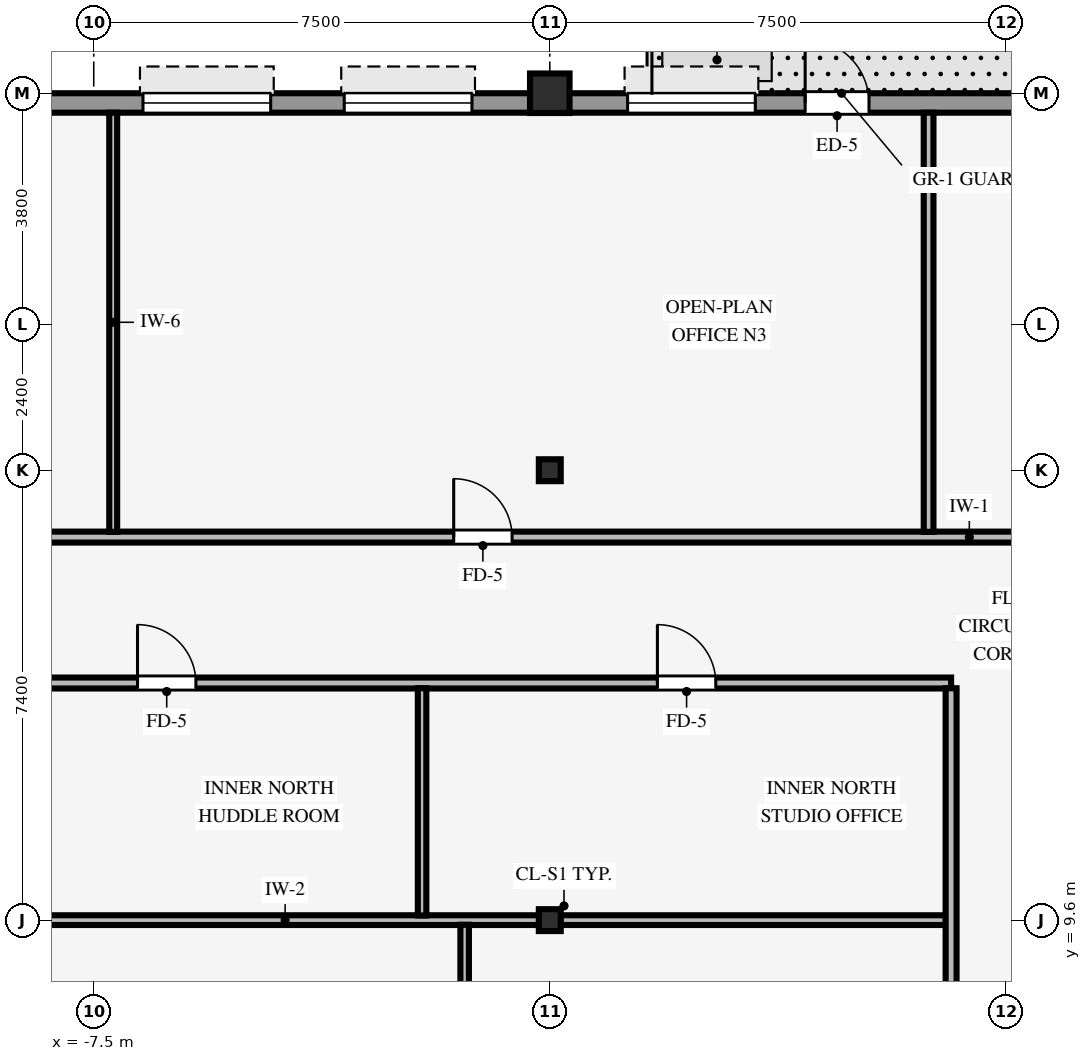
"""IFC4 building model, lengths in metres.
Left out: names, types, materials, properties, quantities, classifications, styles, units other than length and angle.
Written with IfcOpenShell. Run it as: python <this file> out.ifc"""

import sys

from ifc_helpers import new_model, si_unit, direction, frame, frame_2d, origin, origin_2d, place, context, subcontext, project, spatial, rectangle, hollow_rectangle, i_section, extrude, source, transform, mapped, element, fill, save


model = new_model("IFC4")
c1 = context("Model", 3, precision=1e-05, world=origin(), true_north=direction((0.0, 1.0)))
c2 = subcontext(c1, "Body", "Model", "MODEL_VIEW")
j1 = project(units=[si_unit("LENGTHUNIT", "METRE"), si_unit("PLANEANGLEUNIT", "RADIAN")], contexts=[c1])
p1 = place(None, origin())
s1 = spatial("IfcSite", under=j1, at=p1, CompositionType="ELEMENT")
p2 = place(p1, origin())
s2 = spatial("IfcBuilding", under=s1, at=p2, CompositionType="ELEMENT")
p3 = place(p2, frame((0.0, 0.0, 160.35)))
s3 = spatial("IfcBuildingStorey", under=s2, at=p3, CompositionType="ELEMENT", Elevation=160.35)
p4 = place(p3, frame((0.0, 23.2, 0.0), z_axis=(0.0, 0.0, 1.0), x_axis=(1.0, 0.0, 0.0)))
e1 = element("IfcColumn", 1, at=p4, inside=s3, PredefinedType="COLUMN", context=c2, shape_type="SweptSolid", body=[
    extrude(hollow_rectangle(XDim=0.65, YDim=0.65, WallThickness=0.04, InnerFilletRadius=0.04, OuterFilletRadius=0.08, at=origin_2d()), origin(), (0.0, 0.0, 1.0), 3.37),
])
for number, where, z_axis, x_axis in (
    (2, (0.0, 9.6, 0.0), (0.0, 0.0, 1.0), (1.0, 0.0, 0.0)),
    (3, (0.0, 17.0, 0.0), (0.0, 0.0, 1.0), (1.0, 0.0, 0.0)),
):
    element("IfcColumn", number, at=place(p3, frame(where, z_axis=z_axis, x_axis=x_axis)), inside=s3, PredefinedType="COLUMN", context=c2, shape_type="SweptSolid", body=[
        extrude(i_section(OverallWidth=0.36, OverallDepth=0.36, WebThickness=0.021, FlangeThickness=0.021, FilletRadius=0.018, at=origin_2d()), origin(), (0.0, 0.0, 1.0), 3.37),
    ])
p5 = place(p3, frame((-24.3, 23.04, 0.0), z_axis=(0.0, 0.0, 1.0), x_axis=(1.0, 0.0, 0.0)))
e4 = element("IfcWall", 4, at=p5, inside=s3, PredefinedType="STANDARD", context=c2, shape_type="SweptSolid", body=[
    extrude(rectangle(XDim=48.6, YDim=0.32, at=frame_2d((24.3, 0.0))), origin(), (0.0, 0.0, 1.0), 2.705),
])
p6 = place(p5, frame((28.5, 0.0, 0.0)))
e5 = element("IfcOpeningElement", 5, at=p6, cuts=e4, PredefinedType="OPENING", context=c2, shape_type="SweptSolid", body=[
    extrude(rectangle(XDim=1.05, YDim=2.1, at=frame_2d((0.525, 1.05))), frame((0.0, 0.17, 0.0), z_axis=(0.0, -1.0, 0.0), x_axis=(1.0, 0.0, 0.0)), (0.0, 0.0, 1.0), 0.34),
])
p7 = place(p5, frame((2.28, 0.0, 0.8)))
e6 = element("IfcOpeningElement", 6, at=p7, cuts=e4, PredefinedType="OPENING", context=c2, shape_type="SweptSolid", body=[
    extrude(rectangle(XDim=2.1, YDim=1.56, at=frame_2d((1.05, 0.78))), frame((0.0, 0.17, 0.0), z_axis=(0.0, -1.0, 0.0), x_axis=(1.0, 0.0, 0.0)), (0.0, 0.0, 1.0), 0.34),
])
p8 = place(p5, frame((6.94, 0.0, 0.8)))
e7 = element("IfcOpeningElement", 7, at=p8, cuts=e4, PredefinedType="OPENING", context=c2, shape_type="SweptSolid", body=[
    extrude(rectangle(XDim=2.1, YDim=1.56, at=frame_2d((1.05, 0.78))), frame((0.0, 0.17, 0.0), z_axis=(0.0, -1.0, 0.0), x_axis=(1.0, 0.0, 0.0)), (0.0, 0.0, 1.0), 0.34),
])
p9 = place(p5, frame((11.6, 0.0, 0.8)))
e8 = element("IfcOpeningElement", 8, at=p9, cuts=e4, PredefinedType="OPENING", context=c2, shape_type="SweptSolid", body=[
    extrude(rectangle(XDim=2.1, YDim=1.56, at=frame_2d((1.05, 0.78))), frame((0.0, 0.17, 0.0), z_axis=(0.0, -1.0, 0.0), x_axis=(1.0, 0.0, 0.0)), (0.0, 0.0, 1.0), 0.34),
])
p10 = place(p5, frame((17.61, 0.0, 0.8)))
e9 = element("IfcOpeningElement", 9, at=p10, cuts=e4, PredefinedType="OPENING", context=c2, shape_type="SweptSolid", body=[
    extrude(rectangle(XDim=2.1, YDim=1.56, at=frame_2d((1.05, 0.78))), frame((0.0, 0.17, 0.0), z_axis=(0.0, -1.0, 0.0), x_axis=(1.0, 0.0, 0.0)), (0.0, 0.0, 1.0), 0.34),
])
p11 = place(p5, frame((20.92, 0.0, 0.8)))
e10 = element("IfcOpeningElement", 10, at=p11, cuts=e4, PredefinedType="OPENING", context=c2, shape_type="SweptSolid", body=[
    extrude(rectangle(XDim=2.1, YDim=1.56, at=frame_2d((1.05, 0.78))), frame((0.0, 0.17, 0.0), z_axis=(0.0, -1.0, 0.0), x_axis=(1.0, 0.0, 0.0)), (0.0, 0.0, 1.0), 0.34),
])
p12 = place(p5, frame((25.58, 0.0, 0.8)))
e11 = element("IfcOpeningElement", 11, at=p12, cuts=e4, PredefinedType="OPENING", context=c2, shape_type="SweptSolid", body=[
    extrude(rectangle(XDim=2.1, YDim=1.56, at=frame_2d((1.05, 0.78))), frame((0.0, 0.17, 0.0), z_axis=(0.0, -1.0, 0.0), x_axis=(1.0, 0.0, 0.0)), (0.0, 0.0, 1.0), 0.34),
])
p13 = place(p5, frame((34.9, 0.0, 0.8)))
e12 = element("IfcOpeningElement", 12, at=p13, cuts=e4, PredefinedType="OPENING", context=c2, shape_type="SweptSolid", body=[
    extrude(rectangle(XDim=2.1, YDim=1.56, at=frame_2d((1.05, 0.78))), frame((0.0, 0.17, 0.0), z_axis=(0.0, -1.0, 0.0), x_axis=(1.0, 0.0, 0.0)), (0.0, 0.0, 1.0), 0.34),
])
p14 = place(p5, frame((39.56, 0.0, 0.8)))
e13 = element("IfcOpeningElement", 13, at=p14, cuts=e4, PredefinedType="OPENING", context=c2, shape_type="SweptSolid", body=[
    extrude(rectangle(XDim=2.1, YDim=1.56, at=frame_2d((1.05, 0.78))), frame((0.0, 0.17, 0.0), z_axis=(0.0, -1.0, 0.0), x_axis=(1.0, 0.0, 0.0)), (0.0, 0.0, 1.0), 0.34),
])
p15 = place(p5, frame((44.22, 0.0, 0.8)))
e14 = element("IfcOpeningElement", 14, at=p15, cuts=e4, PredefinedType="OPENING", context=c2, shape_type="SweptSolid", body=[
    extrude(rectangle(XDim=2.1, YDim=1.56, at=frame_2d((1.05, 0.78))), frame((0.0, 0.17, 0.0), z_axis=(0.0, -1.0, 0.0), x_axis=(1.0, 0.0, 0.0)), (0.0, 0.0, 1.0), 0.34),
])
p16 = place(p3, frame((-8.529, 9.6, 0.0), z_axis=(0.0, 0.0, 1.0), x_axis=(1.0, 0.0, 0.0)))
e15 = element("IfcWall", 15, at=p16, inside=s3, PredefinedType="PARTITIONING", context=c2, shape_type="SweptSolid", body=[
    extrude(rectangle(XDim=8.353, YDim=0.16, at=frame_2d((4.177, 0.0))), origin(), (0.0, 0.0, 1.0), 2.405),
])
p17 = place(p3, frame((0.176, 9.6, 0.0), z_axis=(0.0, 0.0, 1.0), x_axis=(1.0, 0.0, 0.0)))
e16 = element("IfcWall", 16, at=p17, inside=s3, PredefinedType="PARTITIONING", context=c2, shape_type="SweptSolid", body=[
    extrude(rectangle(XDim=6.338, YDim=0.16, at=frame_2d((3.169, 0.0))), origin(), (0.0, 0.0, 1.0), 2.405),
])
p18 = place(p3, frame((-17.7, 13.5, 0.0), z_axis=(0.0, 0.0, 1.0), x_axis=(1.0, 0.0, 0.0)))
e17 = element("IfcWall", 17, at=p18, inside=s3, PredefinedType="PARTITIONING", context=c2, shape_type="SweptSolid", body=[
    extrude(rectangle(XDim=24.3, YDim=0.18, at=frame_2d((12.15, 0.0))), origin(), (0.0, 0.0, 1.0), 2.998),
])
p19 = place(p18, frame((19.47, 0.0, 0.0)))
e18 = element("IfcOpeningElement", 18, at=p19, cuts=e17, PredefinedType="OPENING", context=c2, shape_type="SweptSolid", body=[
    extrude(rectangle(XDim=0.96, YDim=2.1, at=frame_2d((0.48, 1.05))), frame((0.0, 0.1, 0.0), z_axis=(0.0, -1.0, 0.0), x_axis=(1.0, 0.0, 0.0)), (0.0, 0.0, 1.0), 0.2),
])
p20 = place(p18, frame((10.92, 0.0, 0.0)))
e19 = element("IfcOpeningElement", 19, at=p20, cuts=e17, PredefinedType="OPENING", context=c2, shape_type="SweptSolid", body=[
    extrude(rectangle(XDim=0.96, YDim=2.1, at=frame_2d((0.48, 1.05))), frame((0.0, 0.1, 0.0), z_axis=(0.0, -1.0, 0.0), x_axis=(1.0, 0.0, 0.0)), (0.0, 0.0, 1.0), 0.2),
])
p21 = place(p18, frame((3.3, 0.0, 0.0)))
e20 = element("IfcOpeningElement", 20, at=p21, cuts=e17, PredefinedType="OPENING", context=c2, shape_type="SweptSolid", body=[
    extrude(rectangle(XDim=0.9, YDim=2.1, at=frame_2d((0.45, 1.05))), frame((0.0, 0.1, 0.0), z_axis=(0.0, -1.0, 0.0), x_axis=(1.0, 0.0, 0.0)), (0.0, 0.0, 1.0), 0.2),
])
p22 = place(p18, frame((5.65, 0.0, 0.0)))
e21 = element("IfcOpeningElement", 21, at=p22, cuts=e17, PredefinedType="OPENING", context=c2, shape_type="SweptSolid", body=[
    extrude(rectangle(XDim=0.9, YDim=2.1, at=frame_2d((0.45, 1.05))), frame((0.0, 0.1, 0.0), z_axis=(0.0, -1.0, 0.0), x_axis=(1.0, 0.0, 0.0)), (0.0, 0.0, 1.0), 0.2),
])
p23 = place(p3, frame((-26.08, 15.9, 0.0), z_axis=(0.0, 0.0, 1.0), x_axis=(1.0, 0.0, 0.0)))
e22 = element("IfcWall", 22, at=p23, inside=s3, PredefinedType="PARTITIONING", context=c2, shape_type="SweptSolid", body=[
    extrude(rectangle(XDim=52.16, YDim=0.18, at=frame_2d((26.08, 0.0))), origin(), (0.0, 0.0, 1.0), 3.36),
])
p24 = place(p23, frame((24.5, 0.0, 0.0)))
e23 = element("IfcOpeningElement", 23, at=p24, cuts=e22, PredefinedType="OPENING", context=c2, shape_type="SweptSolid", body=[
    extrude(rectangle(XDim=0.96, YDim=2.1, at=frame_2d((0.48, 1.05))), frame((0.0, 0.1, 0.0), z_axis=(0.0, -1.0, 0.0), x_axis=(1.0, 0.0, 0.0)), (0.0, 0.0, 1.0), 0.2),
])
p25 = place(p23, frame((40.5, 0.0, 0.0)))
e24 = element("IfcOpeningElement", 24, at=p25, cuts=e22, PredefinedType="OPENING", context=c2, shape_type="SweptSolid", body=[
    extrude(rectangle(XDim=0.96, YDim=2.1, at=frame_2d((0.48, 1.05))), frame((0.0, 0.1, 0.0), z_axis=(0.0, -1.0, 0.0), x_axis=(1.0, 0.0, 0.0)), (0.0, 0.0, 1.0), 0.2),
])
p26 = place(p23, frame((13.16, 0.0, 0.0)))
e25 = element("IfcOpeningElement", 25, at=p26, cuts=e22, PredefinedType="OPENING", context=c2, shape_type="SweptSolid", body=[
    extrude(rectangle(XDim=0.96, YDim=2.1, at=frame_2d((0.48, 1.05))), frame((0.0, 0.1, 0.0), z_axis=(0.0, -1.0, 0.0), x_axis=(1.0, 0.0, 0.0)), (0.0, 0.0, 1.0), 0.2),
])
p27 = place(p23, frame((6.425, 0.0, 0.0)))
e26 = element("IfcOpeningElement", 26, at=p27, cuts=e22, PredefinedType="OPENING", context=c2, shape_type="SweptSolid", body=[
    extrude(rectangle(XDim=0.96, YDim=2.1, at=frame_2d((0.48, 1.05))), frame((0.0, 0.1, 0.0), z_axis=(0.0, -1.0, 0.0), x_axis=(1.0, 0.0, 0.0)), (0.0, 0.0, 1.0), 0.2),
])
p28 = place(p3, frame((-7.18, 15.986, 0.0), z_axis=(0.0, 0.0, 1.0), x_axis=(0.0, 1.0, 0.0)))
e27 = element("IfcWall", 27, at=p28, inside=s3, PredefinedType="PARTITIONING", context=c2, shape_type="SweptSolid", body=[
    extrude(rectangle(XDim=6.894, YDim=0.13, at=frame_2d((3.447, 0.0))), origin(), (0.0, 0.0, 1.0), 3.36),
])
p29 = place(p3, frame((-2.1, 9.676, 0.0), z_axis=(0.0, 0.0, 1.0), x_axis=(0.0, 1.0, 0.0)))
e28 = element("IfcWall", 28, at=p29, inside=s3, PredefinedType="PARTITIONING", context=c2, shape_type="SweptSolid", body=[
    extrude(rectangle(XDim=3.738, YDim=0.14, at=frame_2d((1.869, 0.0))), origin(), (0.0, 0.0, 1.0), 3.36),
])
p30 = place(p3, frame((-1.4, 1.336, 0.0), z_axis=(0.0, 0.0, 1.0), x_axis=(0.0, 1.0, 0.0)))
e29 = element("IfcWall", 29, at=p30, inside=s3, PredefinedType="PARTITIONING", context=c2, shape_type="SweptSolid", body=[
    extrude(rectangle(XDim=8.188, YDim=0.14, at=frame_2d((4.094, 0.0))), origin(), (0.0, 0.0, 1.0), 3.36),
])
p31 = place(p3, frame((6.23, 15.986, 0.0), z_axis=(0.0, 0.0, 1.0), x_axis=(0.0, 1.0, 0.0)))
e30 = element("IfcWall", 30, at=p31, inside=s3, PredefinedType="PARTITIONING", context=c2, shape_type="SweptSolid", body=[
    extrude(rectangle(XDim=6.894, YDim=0.16, at=frame_2d((3.447, 0.0))), origin(), (0.0, 0.0, 1.0), 3.36),
])
p32 = place(p3, frame((6.6, 1.336, 0.0), z_axis=(0.0, 0.0, 1.0), x_axis=(0.0, 1.0, 0.0)))
e31 = element("IfcWall", 31, at=p32, inside=s3, PredefinedType="PARTITIONING", context=c2, shape_type="SweptSolid", body=[
    extrude(rectangle(XDim=12.078, YDim=0.18, at=frame_2d((6.039, 0.0))), origin(), (0.0, 0.0, 1.0), 3.36),
])
p33 = place(p32, frame((3.652, 0.0, 0.0)))
e32 = element("IfcOpeningElement", 32, at=p33, cuts=e31, PredefinedType="OPENING", context=c2, shape_type="SweptSolid", body=[
    extrude(rectangle(XDim=0.96, YDim=2.1, at=frame_2d((0.48, 1.05))), frame((0.0, 0.1, 0.0), z_axis=(0.0, -1.0, 0.0), x_axis=(1.0, 0.0, 0.0)), (0.0, 0.0, 1.0), 0.2),
])
m1 = source(origin(), c2, "Body", "SweptSolid", [
    extrude(rectangle(XDim=1.05, YDim=2.1, at=frame_2d((0.525, 1.05))), frame((0.0, 0.025, 0.0), z_axis=(0.0, -1.0, 0.0), x_axis=(1.0, 0.0, 0.0)), (0.0, 0.0, 1.0), 0.05),
])
p34 = place(p6, origin())
e33 = element("IfcDoor", 33, at=p34, inside=s3, OperationType="SINGLE_SWING_LEFT", PredefinedType="DOOR", context=c2, shape_type="MappedRepresentation", body=[
    mapped(m1, transform((0.0, 0.0, 0.0), scale=1.0)),
])
fill(e5, e33)
m2 = source(origin(), c2, "Body", "SweptSolid", [
    extrude(rectangle(XDim=2.1, YDim=1.56, at=frame_2d((1.05, 0.78))), frame((0.0, 0.03, 0.0), z_axis=(0.0, -1.0, 0.0), x_axis=(1.0, 0.0, 0.0)), (0.0, 0.0, 1.0), 0.06),
])
p35 = place(p10, origin())
e34 = element("IfcWindow", 34, at=p35, inside=s3, PartitioningType="SINGLE_PANEL", PredefinedType="WINDOW", context=c2, shape_type="MappedRepresentation", body=[
    mapped(m2, transform((0.0, 0.0, 0.0), scale=1.0)),
])
fill(e9, e34)
p36 = place(p11, origin())
e35 = element("IfcWindow", 35, at=p36, inside=s3, PartitioningType="SINGLE_PANEL", PredefinedType="WINDOW", context=c2, shape_type="MappedRepresentation", body=[
    mapped(m2, transform((0.0, 0.0, 0.0), scale=1.0)),
])
fill(e10, e35)
p37 = place(p12, origin())
e36 = element("IfcWindow", 36, at=p37, inside=s3, PartitioningType="SINGLE_PANEL", PredefinedType="WINDOW", context=c2, shape_type="MappedRepresentation", body=[
    mapped(m2, transform((0.0, 0.0, 0.0), scale=1.0)),
])
fill(e11, e36)
m3 = source(origin(), c2, "Body", "SweptSolid", [
    extrude(rectangle(XDim=0.96, YDim=2.1, at=frame_2d((0.48, 1.05))), frame((0.0, 0.025, 0.0), z_axis=(0.0, -1.0, 0.0), x_axis=(1.0, 0.0, 0.0)), (0.0, 0.0, 1.0), 0.05),
])
p38 = place(p24, origin())
e37 = element("IfcDoor", 37, at=p38, inside=s3, OperationType="SINGLE_SWING_LEFT", PredefinedType="DOOR", context=c2, shape_type="MappedRepresentation", body=[
    mapped(m3, transform((0.0, 0.0, 0.0), scale=1.0)),
])
fill(e23, e37)
p39 = place(p19, origin())
e38 = element("IfcDoor", 38, at=p39, inside=s3, OperationType="SINGLE_SWING_LEFT", PredefinedType="DOOR", context=c2, shape_type="MappedRepresentation", body=[
    mapped(m3, transform((0.0, 0.0, 0.0), scale=1.0)),
])
fill(e18, e38)
p40 = place(p20, origin())
e39 = element("IfcDoor", 39, at=p40, inside=s3, OperationType="SINGLE_SWING_LEFT", PredefinedType="DOOR", context=c2, shape_type="MappedRepresentation", body=[
    mapped(m3, transform((0.0, 0.0, 0.0), scale=1.0)),
])
fill(e19, e39)
save(model, sys.argv[1])
